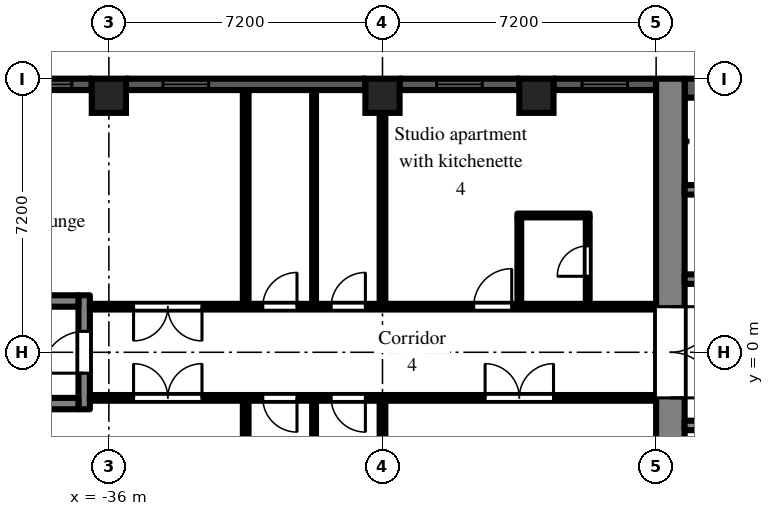
"""IFC4 building model, lengths in metres.
Left out: names, types, materials, properties, quantities, classifications, styles, units other than length and angle.
Written with IfcOpenShell. Run it as: python <this file> out.ifc"""

import sys

from ifc_helpers import new_model, si_unit, direction, frame, frame_2d, origin, origin_2d, place, context, subcontext, project, spatial, rectangle, extrude, element, fill, save


model = new_model("IFC4")
c1 = context("Model", 3, precision=1e-05, world=origin(), true_north=direction((0.0, 1.0)))
c2 = subcontext(c1, "Body", "Model", "MODEL_VIEW")
j1 = project(units=[si_unit("LENGTHUNIT", "METRE"), si_unit("PLANEANGLEUNIT", "RADIAN")], contexts=[c1])
p1 = place(None, origin())
s1 = spatial("IfcSite", under=j1, at=p1, CompositionType="ELEMENT")
p2 = place(p1, origin())
s2 = spatial("IfcBuilding", under=s1, at=p2, CompositionType="ELEMENT")
p3 = place(p2, frame((0.0, 0.0, 102.9)))
s3 = spatial("IfcBuildingStorey", under=s2, at=p3, CompositionType="ELEMENT", Elevation=102.9)
for number, where, z_axis, x_axis in (
    (1, (-36.0, 6.75, 0.0), (0.0, 0.0, 1.0), (1.0, 0.0, 0.0)),
    (2, (-28.8, 6.75, 0.0), (0.0, 0.0, 1.0), (1.0, 0.0, 0.0)),
    (3, (-24.75, 6.75, 0.0), (0.0, 0.0, 1.0), (1.0, 0.0, 0.0)),
):
    element("IfcColumn", number, at=place(p3, frame(where, z_axis=z_axis, x_axis=x_axis)), inside=s3, PredefinedType="COLUMN", context=c2, shape_type="SweptSolid", body=[
        extrude(rectangle(XDim=0.9, YDim=0.9, at=origin_2d()), origin(), (0.0, 0.0, 1.0), 3.0),
    ])
p4 = place(p3, frame((-21.6, 7.05, 0.0), z_axis=(0.0, 0.0, 1.0), x_axis=(-1.0, 0.0, 0.0)))
e4 = element("IfcWall", 4, at=p4, inside=s3, PredefinedType="SOLIDWALL", context=c2, shape_type="SweptSolid", body=[
    extrude(rectangle(XDim=2.7, YDim=0.3, at=frame_2d((1.35, 0.0))), origin(), (0.0, 0.0, 1.0), 2.1),
])
p5 = place(p4, frame((0.75, 0.0, 0.2)))
e5 = element("IfcOpeningElement", 5, at=p5, cuts=e4, PredefinedType="OPENING", context=c2, shape_type="SweptSolid", body=[
    extrude(rectangle(XDim=1.2, YDim=1.85, at=frame_2d((0.6, 0.925))), frame((0.0, 0.16, 0.0), z_axis=(0.0, -1.0, 0.0), x_axis=(1.0, 0.0, 0.0)), (0.0, 0.0, 1.0), 0.32),
])
p6 = place(p3, frame((-25.2, 7.05, 0.0), z_axis=(0.0, 0.0, 1.0), x_axis=(-1.0, 0.0, 0.0)))
e6 = element("IfcWall", 6, at=p6, inside=s3, PredefinedType="SOLIDWALL", context=c2, shape_type="SweptSolid", body=[
    extrude(rectangle(XDim=3.15, YDim=0.3, at=frame_2d((1.575, 0.0))), origin(), (0.0, 0.0, 1.0), 2.1),
])
p7 = place(p6, frame((0.975, 0.0, 0.2)))
e7 = element("IfcOpeningElement", 7, at=p7, cuts=e6, PredefinedType="OPENING", context=c2, shape_type="SweptSolid", body=[
    extrude(rectangle(XDim=1.2, YDim=1.85, at=frame_2d((0.6, 0.925))), frame((0.0, 0.16, 0.0), z_axis=(0.0, -1.0, 0.0), x_axis=(1.0, 0.0, 0.0)), (0.0, 0.0, 1.0), 0.32),
])
p8 = place(p3, frame((-29.25, 7.05, 0.0), z_axis=(0.0, 0.0, 1.0), x_axis=(-1.0, 0.0, 0.0)))
e8 = element("IfcWall", 8, at=p8, inside=s3, PredefinedType="SOLIDWALL", context=c2, shape_type="SweptSolid", body=[
    extrude(rectangle(XDim=6.3, YDim=0.3, at=frame_2d((3.15, 0.0))), origin(), (0.0, 0.0, 1.0), 2.1),
])
p9 = place(p8, frame((4.125, 0.0, 0.2)))
e9 = element("IfcOpeningElement", 9, at=p9, cuts=e8, PredefinedType="OPENING", context=c2, shape_type="SweptSolid", body=[
    extrude(rectangle(XDim=1.2, YDim=1.85, at=frame_2d((0.6, 0.925))), frame((0.0, 0.16, 0.0), z_axis=(0.0, -1.0, 0.0), x_axis=(1.0, 0.0, 0.0)), (0.0, 0.0, 1.0), 0.32),
])
p10 = place(p3, frame((-36.45, 7.05, 0.0), z_axis=(0.0, 0.0, 1.0), x_axis=(-1.0, 0.0, 0.0)))
e10 = element("IfcWall", 10, at=p10, inside=s3, PredefinedType="SOLIDWALL", context=c2, shape_type="SweptSolid", body=[
    extrude(rectangle(XDim=2.25, YDim=0.3, at=frame_2d((1.125, 0.0))), origin(), (0.0, 0.0, 1.0), 2.1),
])
p11 = place(p10, frame((0.525, 0.0, 0.2)))
e11 = element("IfcOpeningElement", 11, at=p11, cuts=e10, PredefinedType="OPENING", context=c2, shape_type="SweptSolid", body=[
    extrude(rectangle(XDim=1.2, YDim=1.85, at=frame_2d((0.6, 0.925))), frame((0.0, 0.16, 0.0), z_axis=(0.0, -1.0, 0.0), x_axis=(1.0, 0.0, 0.0)), (0.0, 0.0, 1.0), 0.32),
])
p12 = place(p3, frame((-21.225, -7.2, 0.0), z_axis=(0.0, 0.0, 1.0), x_axis=(0.0, 1.0, 0.0)))
e12 = element("IfcWall", 12, at=p12, inside=s3, PredefinedType="SHEAR", context=c2, shape_type="SweptSolid", body=[
    extrude(rectangle(XDim=14.4, YDim=0.75, at=frame_2d((7.2, 0.0))), origin(), (0.0, 0.0, 1.0), 2.575),
])
p13 = place(p12, frame((6.0, 0.0, 0.0)))
e13 = element("IfcOpeningElement", 13, at=p13, cuts=e12, PredefinedType="OPENING", context=c2, shape_type="SweptSolid", body=[
    extrude(rectangle(XDim=2.4, YDim=2.2, at=frame_2d((1.2, 1.1))), frame((0.0, 0.385, 0.0), z_axis=(0.0, -1.0, 0.0), x_axis=(1.0, 0.0, 0.0)), (0.0, 0.0, 1.0), 0.77),
])
p14 = place(p3, frame((-7.9, 6.95, 0.0), z_axis=(0.0, 0.0, 1.0), x_axis=(-1.0, 0.0, 0.0)))
e14 = element("IfcWall", 14, at=p14, inside=s3, PredefinedType="SHEAR", context=c2, shape_type="SweptSolid", body=[
    extrude(rectangle(XDim=12.95, YDim=0.5, at=frame_2d((6.475, 0.0))), origin(), (0.0, 0.0, 1.0), 2.575),
])
p15 = place(p3, frame((-7.9, 1.925, 0.0), z_axis=(0.0, 0.0, 1.0), x_axis=(-1.0, 0.0, 0.0)))
e15 = element("IfcWall", 15, at=p15, inside=s3, PredefinedType="SHEAR", context=c2, shape_type="SweptSolid", body=[
    extrude(rectangle(XDim=12.95, YDim=0.25, at=frame_2d((6.475, 0.0))), origin(), (0.0, 0.0, 1.0), 2.575),
])
p16 = place(p15, frame((0.525, 0.0, 0.0)))
e16 = element("IfcOpeningElement", 16, at=p16, cuts=e15, PredefinedType="OPENING", context=c2, shape_type="SweptSolid", body=[
    extrude(rectangle(XDim=0.9, YDim=2.1, at=frame_2d((0.45, 1.05))), frame((0.0, 0.135, 0.0), z_axis=(0.0, -1.0, 0.0), x_axis=(1.0, 0.0, 0.0)), (0.0, 0.0, 1.0), 0.27),
])
p17 = place(p15, frame((2.625, 0.0, 0.0)))
e17 = element("IfcOpeningElement", 17, at=p17, cuts=e15, PredefinedType="OPENING", context=c2, shape_type="SweptSolid", body=[
    extrude(rectangle(XDim=1.1, YDim=2.1, at=frame_2d((0.55, 1.05))), frame((0.0, 0.135, 0.0), z_axis=(0.0, -1.0, 0.0), x_axis=(1.0, 0.0, 0.0)), (0.0, 0.0, 1.0), 0.27),
])
p18 = place(p15, frame((4.925, 0.0, 0.0)))
e18 = element("IfcOpeningElement", 18, at=p18, cuts=e15, PredefinedType="OPENING", context=c2, shape_type="SweptSolid", body=[
    extrude(rectangle(XDim=0.9, YDim=2.1, at=frame_2d((0.45, 1.05))), frame((0.0, 0.135, 0.0), z_axis=(0.0, -1.0, 0.0), x_axis=(1.0, 0.0, 0.0)), (0.0, 0.0, 1.0), 0.27),
])
p19 = place(p15, frame((8.225, 0.0, 0.0)))
e19 = element("IfcOpeningElement", 19, at=p19, cuts=e15, PredefinedType="OPENING", context=c2, shape_type="SweptSolid", body=[
    extrude(rectangle(XDim=0.9, YDim=2.1, at=frame_2d((0.45, 1.05))), frame((0.0, 0.135, 0.0), z_axis=(0.0, -1.0, 0.0), x_axis=(1.0, 0.0, 0.0)), (0.0, 0.0, 1.0), 0.27),
])
p20 = place(p3, frame((-12.3, 4.275, 0.0), z_axis=(0.0, 0.0, 1.0), x_axis=(-1.0, 0.0, 0.0)))
e20 = element("IfcWall", 20, at=p20, inside=s3, PredefinedType="SHEAR", context=c2, shape_type="SweptSolid", body=[
    extrude(rectangle(XDim=8.55, YDim=0.25, at=frame_2d((4.275, 0.0))), origin(), (0.0, 0.0, 1.0), 2.575),
])
p21 = place(p3, frame((-7.9, -1.925, 0.0), z_axis=(0.0, 0.0, 1.0), x_axis=(-1.0, 0.0, 0.0)))
e21 = element("IfcWall", 21, at=p21, inside=s3, PredefinedType="SHEAR", context=c2, shape_type="SweptSolid", body=[
    extrude(rectangle(XDim=12.95, YDim=0.25, at=frame_2d((6.475, 0.0))), origin(), (0.0, 0.0, 1.0), 2.575),
])
p22 = place(p21, frame((4.825, 0.0, 0.0)))
e22 = element("IfcOpeningElement", 22, at=p22, cuts=e21, PredefinedType="OPENING", context=c2, shape_type="SweptSolid", body=[
    extrude(rectangle(XDim=1.1, YDim=2.1, at=frame_2d((0.55, 1.05))), frame((0.0, 0.135, 0.0), z_axis=(0.0, -1.0, 0.0), x_axis=(1.0, 0.0, 0.0)), (0.0, 0.0, 1.0), 0.27),
])
p23 = place(p21, frame((7.025, 0.0, 0.0)))
e23 = element("IfcOpeningElement", 23, at=p23, cuts=e21, PredefinedType="OPENING", context=c2, shape_type="SweptSolid", body=[
    extrude(rectangle(XDim=1.1, YDim=2.1, at=frame_2d((0.55, 1.05))), frame((0.0, 0.135, 0.0), z_axis=(0.0, -1.0, 0.0), x_axis=(1.0, 0.0, 0.0)), (0.0, 0.0, 1.0), 0.27),
])
p24 = place(p21, frame((9.225, 0.0, 0.0)))
e24 = element("IfcOpeningElement", 24, at=p24, cuts=e21, PredefinedType="OPENING", context=c2, shape_type="SweptSolid", body=[
    extrude(rectangle(XDim=1.1, YDim=2.1, at=frame_2d((0.55, 1.05))), frame((0.0, 0.135, 0.0), z_axis=(0.0, -1.0, 0.0), x_axis=(1.0, 0.0, 0.0)), (0.0, 0.0, 1.0), 0.27),
])
p25 = place(p21, frame((0.525, 0.0, 0.0)))
e25 = element("IfcOpeningElement", 25, at=p25, cuts=e21, PredefinedType="OPENING", context=c2, shape_type="SweptSolid", body=[
    extrude(rectangle(XDim=0.9, YDim=2.1, at=frame_2d((0.45, 1.05))), frame((0.0, 0.135, 0.0), z_axis=(0.0, -1.0, 0.0), x_axis=(1.0, 0.0, 0.0)), (0.0, 0.0, 1.0), 0.27),
])
p26 = place(p21, frame((2.625, 0.0, 0.0)))
e26 = element("IfcOpeningElement", 26, at=p26, cuts=e21, PredefinedType="OPENING", context=c2, shape_type="SweptSolid", body=[
    extrude(rectangle(XDim=1.1, YDim=2.1, at=frame_2d((0.55, 1.05))), frame((0.0, 0.135, 0.0), z_axis=(0.0, -1.0, 0.0), x_axis=(1.0, 0.0, 0.0)), (0.0, 0.0, 1.0), 0.27),
])
p27 = place(p3, frame((-36.65, -1.5, 0.0), z_axis=(0.0, 0.0, 1.0), x_axis=(0.0, 1.0, 0.0)))
e27 = element("IfcWall", 27, at=p27, inside=s3, PredefinedType="SHEAR", context=c2, shape_type="SweptSolid", body=[
    extrude(rectangle(XDim=3.0, YDim=0.3, at=frame_2d((1.5, 0.0))), origin(), (0.0, 0.0, 1.0), 2.575),
])
p28 = place(p27, frame((0.95, 0.0, 0.0)))
e28 = element("IfcOpeningElement", 28, at=p28, cuts=e27, PredefinedType="OPENING", context=c2, shape_type="SweptSolid", body=[
    extrude(rectangle(XDim=1.1, YDim=2.1, at=frame_2d((0.55, 1.05))), frame((0.0, 0.16, 0.0), z_axis=(0.0, -1.0, 0.0), x_axis=(1.0, 0.0, 0.0)), (0.0, 0.0, 1.0), 0.32),
])
for number, where, z_axis, x_axis in (
    (29, (-36.8, -1.35, 0.0), (0.0, 0.0, 1.0), (-1.0, 0.0, 0.0)),
    (30, (-36.8, 1.35, 0.0), (0.0, 0.0, 1.0), (-1.0, 0.0, 0.0)),
):
    element("IfcWall", number, at=place(p3, frame(where, z_axis=z_axis, x_axis=x_axis)), inside=s3, PredefinedType="SHEAR", context=c2, shape_type="SweptSolid", body=[
        extrude(rectangle(XDim=5.8, YDim=0.3, at=frame_2d((2.9, 0.0))), origin(), (0.0, 0.0, 1.0), 2.575),
    ])
p29 = place(p3, frame((-36.5, -1.2, 0.0), z_axis=(0.0, 0.0, 1.0), x_axis=(1.0, 0.0, 0.0)))
e31 = element("IfcWall", 31, at=p29, inside=s3, PredefinedType="PARTITIONING", context=c2, shape_type="SweptSolid", body=[
    extrude(rectangle(XDim=14.9, YDim=0.15, at=frame_2d((7.45, 0.0))), origin(), (0.0, 0.0, 1.0), 2.575),
])
p30 = place(p29, frame((10.4, 0.0, 0.0)))
e32 = element("IfcOpeningElement", 32, at=p30, cuts=e31, PredefinedType="OPENING", context=c2, shape_type="SweptSolid", body=[
    extrude(rectangle(XDim=1.8, YDim=2.1, at=frame_2d((0.9, 1.05))), frame((0.0, 0.085, 0.0), z_axis=(0.0, -1.0, 0.0), x_axis=(1.0, 0.0, 0.0)), (0.0, 0.0, 1.0), 0.17),
])
p31 = place(p29, frame((6.35, 0.0, 0.0)))
e33 = element("IfcOpeningElement", 33, at=p31, cuts=e31, PredefinedType="OPENING", context=c2, shape_type="SweptSolid", body=[
    extrude(rectangle(XDim=0.9, YDim=2.1, at=frame_2d((0.45, 1.05))), frame((0.0, 0.085, 0.0), z_axis=(0.0, -1.0, 0.0), x_axis=(1.0, 0.0, 0.0)), (0.0, 0.0, 1.0), 0.17),
])
p32 = place(p29, frame((4.55, 0.0, 0.0)))
e34 = element("IfcOpeningElement", 34, at=p32, cuts=e31, PredefinedType="OPENING", context=c2, shape_type="SweptSolid", body=[
    extrude(rectangle(XDim=0.9, YDim=2.1, at=frame_2d((0.45, 1.05))), frame((0.0, 0.085, 0.0), z_axis=(0.0, -1.0, 0.0), x_axis=(1.0, 0.0, 0.0)), (0.0, 0.0, 1.0), 0.17),
])
p33 = place(p29, frame((1.15, 0.0, 0.0)))
e35 = element("IfcOpeningElement", 35, at=p33, cuts=e31, PredefinedType="OPENING", context=c2, shape_type="SweptSolid", body=[
    extrude(rectangle(XDim=1.8, YDim=2.1, at=frame_2d((0.9, 1.05))), frame((0.0, 0.085, 0.0), z_axis=(0.0, -1.0, 0.0), x_axis=(1.0, 0.0, 0.0)), (0.0, 0.0, 1.0), 0.17),
])
p34 = place(p3, frame((-36.5, 1.2, 0.0), z_axis=(0.0, 0.0, 1.0), x_axis=(1.0, 0.0, 0.0)))
e36 = element("IfcWall", 36, at=p34, inside=s3, PredefinedType="PARTITIONING", context=c2, shape_type="SweptSolid", body=[
    extrude(rectangle(XDim=14.9, YDim=0.15, at=frame_2d((7.45, 0.0))), origin(), (0.0, 0.0, 1.0), 2.575),
])
p35 = place(p34, frame((10.1, 0.0, 0.0)))
e37 = element("IfcOpeningElement", 37, at=p35, cuts=e36, PredefinedType="OPENING", context=c2, shape_type="SweptSolid", body=[
    extrude(rectangle(XDim=1.0, YDim=2.1, at=frame_2d((0.5, 1.05))), frame((0.0, 0.085, 0.0), z_axis=(0.0, -1.0, 0.0), x_axis=(1.0, 0.0, 0.0)), (0.0, 0.0, 1.0), 0.17),
])
p36 = place(p34, frame((6.35, 0.0, 0.0)))
e38 = element("IfcOpeningElement", 38, at=p36, cuts=e36, PredefinedType="OPENING", context=c2, shape_type="SweptSolid", body=[
    extrude(rectangle(XDim=0.9, YDim=2.1, at=frame_2d((0.45, 1.05))), frame((0.0, 0.085, 0.0), z_axis=(0.0, -1.0, 0.0), x_axis=(1.0, 0.0, 0.0)), (0.0, 0.0, 1.0), 0.17),
])
p37 = place(p34, frame((4.55, 0.0, 0.0)))
e39 = element("IfcOpeningElement", 39, at=p37, cuts=e36, PredefinedType="OPENING", context=c2, shape_type="SweptSolid", body=[
    extrude(rectangle(XDim=0.9, YDim=2.1, at=frame_2d((0.45, 1.05))), frame((0.0, 0.085, 0.0), z_axis=(0.0, -1.0, 0.0), x_axis=(1.0, 0.0, 0.0)), (0.0, 0.0, 1.0), 0.17),
])
p38 = place(p34, frame((1.15, 0.0, 0.0)))
e40 = element("IfcOpeningElement", 40, at=p38, cuts=e36, PredefinedType="OPENING", context=c2, shape_type="SweptSolid", body=[
    extrude(rectangle(XDim=1.8, YDim=2.1, at=frame_2d((0.9, 1.05))), frame((0.0, 0.085, 0.0), z_axis=(0.0, -1.0, 0.0), x_axis=(1.0, 0.0, 0.0)), (0.0, 0.0, 1.0), 0.17),
])
for number, where, z_axis, x_axis in (
    (41, (-32.4, -6.9, 0.0), (0.0, 0.0, 1.0), (0.0, 1.0, 0.0)),
    (42, (-32.4, 1.275, 0.0), (0.0, 0.0, 1.0), (0.0, 1.0, 0.0)),
):
    element("IfcWall", number, at=place(p3, frame(where, z_axis=z_axis, x_axis=x_axis)), inside=s3, PredefinedType="PARTITIONING", context=c2, shape_type="SweptSolid", body=[
        extrude(rectangle(XDim=5.625, YDim=0.15, at=frame_2d((2.812, 0.0))), origin(), (0.0, 0.0, 1.0), 2.575),
    ])
for number, where, z_axis, x_axis in (
    (43, (-30.6, -6.9, 0.0), (0.0, 0.0, 1.0), (0.0, 1.0, 0.0)),
    (44, (-30.6, 1.275, 0.0), (0.0, 0.0, 1.0), (0.0, 1.0, 0.0)),
):
    element("IfcWall", number, at=place(p3, frame(where, z_axis=z_axis, x_axis=x_axis)), inside=s3, PredefinedType="PARTITIONING", context=c2, shape_type="SweptSolid", body=[
        extrude(rectangle(XDim=5.625, YDim=0.1, at=frame_2d((2.812, 0.0))), origin(), (0.0, 0.0, 1.0), 2.575),
    ])
for number, where, z_axis, x_axis in (
    (45, (-28.8, -6.9, 0.0), (0.0, 0.0, 1.0), (0.0, 1.0, 0.0)),
    (46, (-28.8, 1.275, 0.0), (0.0, 0.0, 1.0), (0.0, 1.0, 0.0)),
):
    element("IfcWall", number, at=place(p3, frame(where, z_axis=z_axis, x_axis=x_axis)), inside=s3, PredefinedType="PARTITIONING", context=c2, shape_type="SweptSolid", body=[
        extrude(rectangle(XDim=5.625, YDim=0.15, at=frame_2d((2.812, 0.0))), origin(), (0.0, 0.0, 1.0), 2.575),
    ])
p39 = place(p3, frame((-25.2, 1.275, 0.0), z_axis=(0.0, 0.0, 1.0), x_axis=(0.0, 1.0, 0.0)))
e47 = element("IfcWall", 47, at=p39, inside=s3, PredefinedType="PARTITIONING", context=c2, shape_type="SweptSolid", body=[
    extrude(rectangle(XDim=2.275, YDim=0.1, at=frame_2d((1.138, 0.0))), origin(), (0.0, 0.0, 1.0), 2.575),
])
p40 = place(p3, frame((-25.25, 3.6, 0.0), z_axis=(0.0, 0.0, 1.0), x_axis=(1.0, 0.0, 0.0)))
e48 = element("IfcWall", 48, at=p40, inside=s3, PredefinedType="PARTITIONING", context=c2, shape_type="SweptSolid", body=[
    extrude(rectangle(XDim=1.9, YDim=0.1, at=frame_2d((0.95, 0.0))), origin(), (0.0, 0.0, 1.0), 2.575),
])
p41 = place(p3, frame((-23.4, 1.275, 0.0), z_axis=(0.0, 0.0, 1.0), x_axis=(0.0, 1.0, 0.0)))
e49 = element("IfcWall", 49, at=p41, inside=s3, PredefinedType="PARTITIONING", context=c2, shape_type="SweptSolid", body=[
    extrude(rectangle(XDim=2.275, YDim=0.1, at=frame_2d((1.138, 0.0))), origin(), (0.0, 0.0, 1.0), 2.575),
])
p42 = place(p41, frame((0.725, 0.0, 0.0)))
e50 = element("IfcOpeningElement", 50, at=p42, cuts=e49, PredefinedType="OPENING", context=c2, shape_type="SweptSolid", body=[
    extrude(rectangle(XDim=0.8, YDim=2.1, at=frame_2d((0.4, 1.05))), frame((0.0, 0.06, 0.0), z_axis=(0.0, -1.0, 0.0), x_axis=(1.0, 0.0, 0.0)), (0.0, 0.0, 1.0), 0.12),
])
p43 = place(p5, origin())
e51 = element("IfcWindow", 51, at=p43, inside=s3, PartitioningType="SINGLE_PANEL", PredefinedType="WINDOW", context=c2, shape_type="SweptSolid", body=[
    extrude(rectangle(XDim=1.2, YDim=1.85, at=frame_2d((0.6, 0.925))), frame((0.0, 0.03, 0.0), z_axis=(0.0, -1.0, 0.0), x_axis=(1.0, 0.0, 0.0)), (0.0, 0.0, 1.0), 0.06),
])
fill(e5, e51)
p44 = place(p7, origin())
e52 = element("IfcWindow", 52, at=p44, inside=s3, PartitioningType="SINGLE_PANEL", PredefinedType="WINDOW", context=c2, shape_type="SweptSolid", body=[
    extrude(rectangle(XDim=1.2, YDim=1.85, at=frame_2d((0.6, 0.925))), frame((0.0, 0.03, 0.0), z_axis=(0.0, -1.0, 0.0), x_axis=(1.0, 0.0, 0.0)), (0.0, 0.0, 1.0), 0.06),
])
fill(e7, e52)
p45 = place(p9, origin())
e53 = element("IfcWindow", 53, at=p45, inside=s3, PartitioningType="SINGLE_PANEL", PredefinedType="WINDOW", context=c2, shape_type="SweptSolid", body=[
    extrude(rectangle(XDim=1.2, YDim=1.85, at=frame_2d((0.6, 0.925))), frame((0.0, 0.03, 0.0), z_axis=(0.0, -1.0, 0.0), x_axis=(1.0, 0.0, 0.0)), (0.0, 0.0, 1.0), 0.06),
])
fill(e9, e53)
p46 = place(p11, origin())
e54 = element("IfcWindow", 54, at=p46, inside=s3, PartitioningType="SINGLE_PANEL", PredefinedType="WINDOW", context=c2, shape_type="SweptSolid", body=[
    extrude(rectangle(XDim=1.2, YDim=1.85, at=frame_2d((0.6, 0.925))), frame((0.0, 0.03, 0.0), z_axis=(0.0, -1.0, 0.0), x_axis=(1.0, 0.0, 0.0)), (0.0, 0.0, 1.0), 0.06),
])
fill(e11, e54)
p47 = place(p13, frame((2.4, 0.0, 0.0), z_axis=(0.0, 0.0, 1.0), x_axis=(-1.0, 0.0, 0.0)))
e55 = element("IfcDoor", 55, at=p47, inside=s3, OperationType="DOUBLE_DOOR_DOUBLE_SWING", PredefinedType="DOOR", context=c2, shape_type="SweptSolid", body=[
    extrude(rectangle(XDim=2.4, YDim=2.2, at=frame_2d((1.2, 1.1))), frame((0.0, 0.025, 0.0), z_axis=(0.0, -1.0, 0.0), x_axis=(1.0, 0.0, 0.0)), (0.0, 0.0, 1.0), 0.05),
])
fill(e13, e55)
p48 = place(p28, origin())
e56 = element("IfcDoor", 56, at=p48, inside=s3, OperationType="SINGLE_SWING_LEFT", PredefinedType="DOOR", context=c2, shape_type="SweptSolid", body=[
    extrude(rectangle(XDim=1.1, YDim=2.1, at=frame_2d((0.55, 1.05))), frame((0.0, 0.025, 0.0), z_axis=(0.0, -1.0, 0.0), x_axis=(1.0, 0.0, 0.0)), (0.0, 0.0, 1.0), 0.05),
])
fill(e28, e56)
p49 = place(p30, origin())
e57 = element("IfcDoor", 57, at=p49, inside=s3, OperationType="DOUBLE_DOOR_DOUBLE_SWING", PredefinedType="DOOR", context=c2, shape_type="SweptSolid", body=[
    extrude(rectangle(XDim=1.8, YDim=2.1, at=frame_2d((0.9, 1.05))), frame((0.0, 0.025, 0.0), z_axis=(0.0, -1.0, 0.0), x_axis=(1.0, 0.0, 0.0)), (0.0, 0.0, 1.0), 0.05),
])
fill(e32, e57)
p50 = place(p31, frame((0.9, 0.0, 0.0), z_axis=(0.0, 0.0, 1.0), x_axis=(-1.0, 0.0, 0.0)))
e58 = element("IfcDoor", 58, at=p50, inside=s3, OperationType="SINGLE_SWING_LEFT", PredefinedType="DOOR", context=c2, shape_type="SweptSolid", body=[
    extrude(rectangle(XDim=0.9, YDim=2.1, at=frame_2d((0.45, 1.05))), frame((0.0, 0.025, 0.0), z_axis=(0.0, -1.0, 0.0), x_axis=(1.0, 0.0, 0.0)), (0.0, 0.0, 1.0), 0.05),
])
fill(e33, e58)
p51 = place(p32, frame((0.9, 0.0, 0.0), z_axis=(0.0, 0.0, 1.0), x_axis=(-1.0, 0.0, 0.0)))
e59 = element("IfcDoor", 59, at=p51, inside=s3, OperationType="SINGLE_SWING_LEFT", PredefinedType="DOOR", context=c2, shape_type="SweptSolid", body=[
    extrude(rectangle(XDim=0.9, YDim=2.1, at=frame_2d((0.45, 1.05))), frame((0.0, 0.025, 0.0), z_axis=(0.0, -1.0, 0.0), x_axis=(1.0, 0.0, 0.0)), (0.0, 0.0, 1.0), 0.05),
])
fill(e34, e59)
p52 = place(p33, origin())
e60 = element("IfcDoor", 60, at=p52, inside=s3, OperationType="DOUBLE_DOOR_DOUBLE_SWING", PredefinedType="DOOR", context=c2, shape_type="SweptSolid", body=[
    extrude(rectangle(XDim=1.8, YDim=2.1, at=frame_2d((0.9, 1.05))), frame((0.0, 0.025, 0.0), z_axis=(0.0, -1.0, 0.0), x_axis=(1.0, 0.0, 0.0)), (0.0, 0.0, 1.0), 0.05),
])
fill(e35, e60)
p53 = place(p42, origin())
e61 = element("IfcDoor", 61, at=p53, inside=s3, OperationType="SINGLE_SWING_LEFT", PredefinedType="DOOR", context=c2, shape_type="SweptSolid", body=[
    extrude(rectangle(XDim=0.8, YDim=2.1, at=frame_2d((0.4, 1.05))), frame((0.0, 0.025, 0.0), z_axis=(0.0, -1.0, 0.0), x_axis=(1.0, 0.0, 0.0)), (0.0, 0.0, 1.0), 0.05),
])
fill(e50, e61)
p54 = place(p35, origin())
e62 = element("IfcDoor", 62, at=p54, inside=s3, OperationType="SINGLE_SWING_RIGHT", PredefinedType="DOOR", context=c2, shape_type="SweptSolid", body=[
    extrude(rectangle(XDim=1.0, YDim=2.1, at=frame_2d((0.5, 1.05))), frame((0.0, 0.025, 0.0), z_axis=(0.0, -1.0, 0.0), x_axis=(1.0, 0.0, 0.0)), (0.0, 0.0, 1.0), 0.05),
])
fill(e37, e62)
p55 = place(p36, origin())
e63 = element("IfcDoor", 63, at=p55, inside=s3, OperationType="SINGLE_SWING_RIGHT", PredefinedType="DOOR", context=c2, shape_type="SweptSolid", body=[
    extrude(rectangle(XDim=0.9, YDim=2.1, at=frame_2d((0.45, 1.05))), frame((0.0, 0.025, 0.0), z_axis=(0.0, -1.0, 0.0), x_axis=(1.0, 0.0, 0.0)), (0.0, 0.0, 1.0), 0.05),
])
fill(e38, e63)
p56 = place(p37, origin())
e64 = element("IfcDoor", 64, at=p56, inside=s3, OperationType="SINGLE_SWING_RIGHT", PredefinedType="DOOR", context=c2, shape_type="SweptSolid", body=[
    extrude(rectangle(XDim=0.9, YDim=2.1, at=frame_2d((0.45, 1.05))), frame((0.0, 0.025, 0.0), z_axis=(0.0, -1.0, 0.0), x_axis=(1.0, 0.0, 0.0)), (0.0, 0.0, 1.0), 0.05),
])
fill(e39, e64)
p57 = place(p38, frame((1.8, 0.0, 0.0), z_axis=(0.0, 0.0, 1.0), x_axis=(-1.0, 0.0, 0.0)))
e65 = element("IfcDoor", 65, at=p57, inside=s3, OperationType="DOUBLE_DOOR_DOUBLE_SWING", PredefinedType="DOOR", context=c2, shape_type="SweptSolid", body=[
    extrude(rectangle(XDim=1.8, YDim=2.1, at=frame_2d((0.9, 1.05))), frame((0.0, 0.025, 0.0), z_axis=(0.0, -1.0, 0.0), x_axis=(1.0, 0.0, 0.0)), (0.0, 0.0, 1.0), 0.05),
])
fill(e40, e65)
save(model, sys.argv[1])
